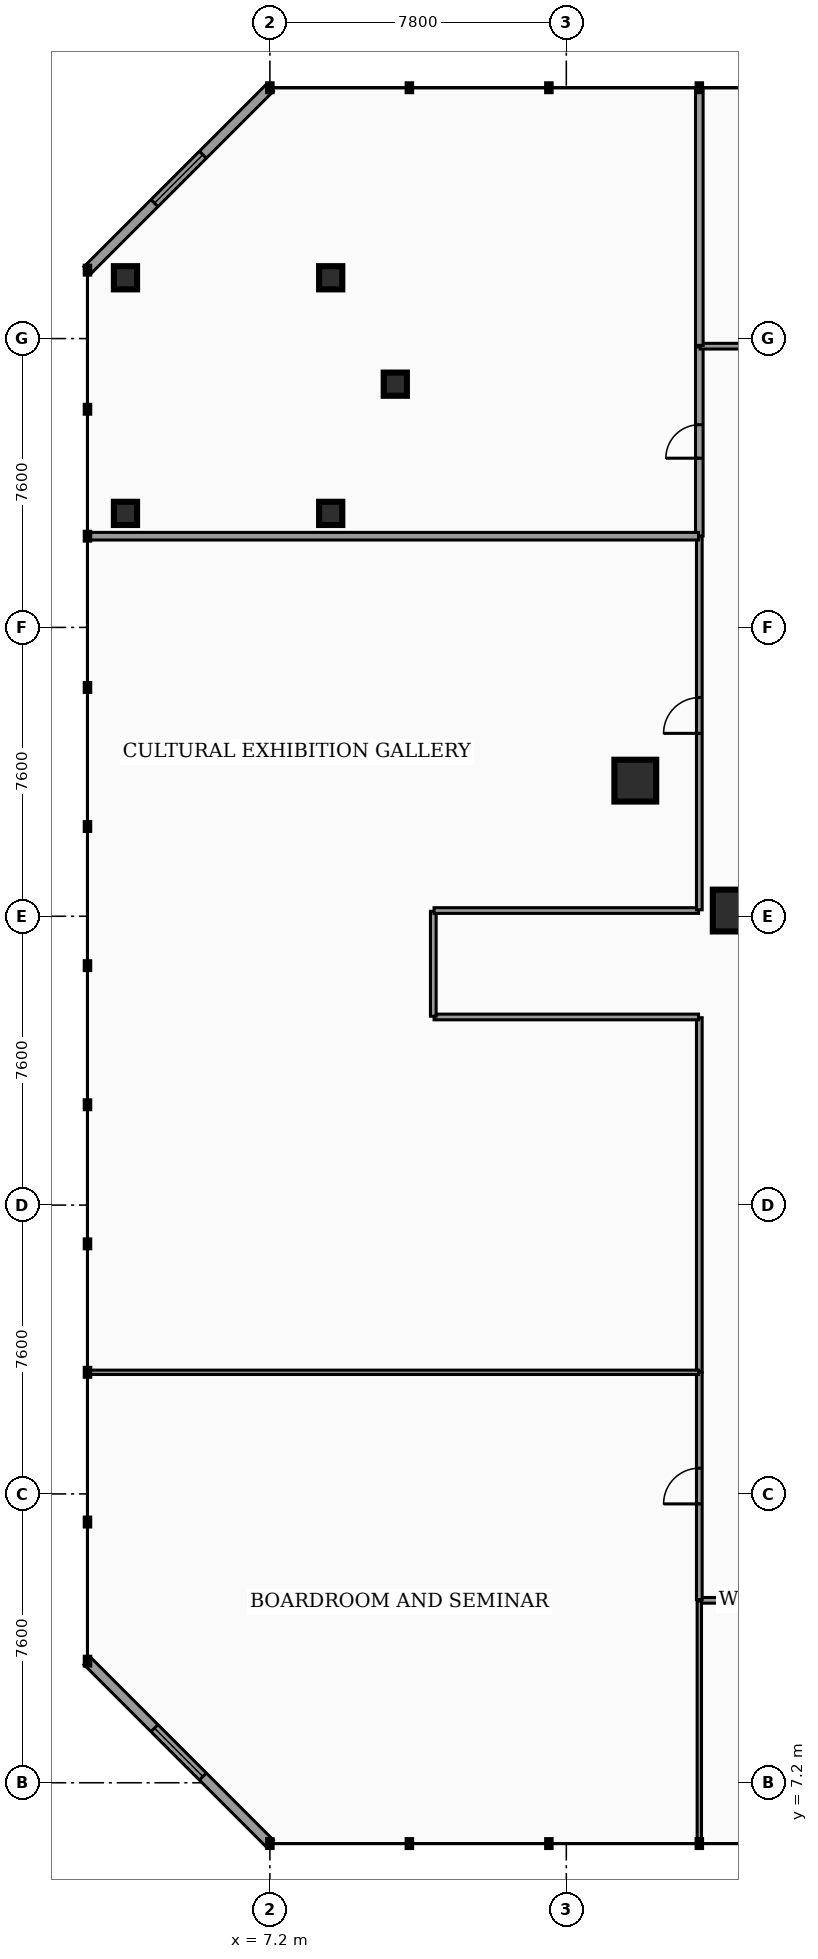
"""IFC4 building model, lengths in metres.
Left out: names, types, materials, properties, quantities, classifications, styles, units other than length and angle.
Written with IfcOpenShell. Run it as: python <this file> out.ifc"""

import sys

from ifc_helpers import new_model, si_unit, direction, frame, frame_2d, origin, origin_2d, place, context, subcontext, project, spatial, rectangle, hollow_rectangle, hollow_circle, extrude, element, fill, save


model = new_model("IFC4")
c1 = context("Model", 3, precision=1e-05, world=origin(), true_north=direction((0.0, 1.0)))
c2 = subcontext(c1, "Body", "Model", "MODEL_VIEW")
j1 = project(units=[si_unit("LENGTHUNIT", "METRE"), si_unit("PLANEANGLEUNIT", "RADIAN")], contexts=[c1])
p1 = place(None, origin())
s1 = spatial("IfcSite", under=j1, at=p1, CompositionType="ELEMENT")
p2 = place(p1, origin())
s2 = spatial("IfcBuilding", under=s1, at=p2, CompositionType="ELEMENT")
p3 = place(p2, frame((0.0, 0.0, 9.52)))
s3 = spatial("IfcBuildingStorey", under=s2, at=p3, CompositionType="ELEMENT", Elevation=9.52)
for number, where, z_axis, x_axis in (
    (1, (16.815, 33.568, 0.0), (0.0, 0.0, 1.0), (1.0, 0.0, 0.0)),
    (2, (19.405, 30.15, 0.0), (0.0, 0.0, 1.0), (1.0, 0.0, 0.0)),
):
    element("IfcColumn", number, at=place(p3, frame(where, z_axis=z_axis, x_axis=x_axis)), inside=s3, PredefinedType="COLUMN", context=c2, shape_type="SweptSolid", body=[
        extrude(hollow_rectangle(XDim=1.1, YDim=1.1, WallThickness=0.055, at=origin_2d()), origin(), (0.0, 0.0, 1.0), 4.14),
    ])
for number, where, z_axis, x_axis in (
    (3, (10.5, 44.0, 0.0), (0.0, 0.0, 1.0), (1.0, 0.0, 0.0)),
    (4, (3.4, 40.6, 0.0), (0.0, 0.0, 1.0), (1.0, 0.0, 0.0)),
    (5, (8.8, 40.6, 0.0), (0.0, 0.0, 1.0), (1.0, 0.0, 0.0)),
    (6, (3.4, 46.8, 0.0), (0.0, 0.0, 1.0), (1.0, 0.0, 0.0)),
    (7, (8.8, 46.8, 0.0), (0.0, 0.0, 1.0), (1.0, 0.0, 0.0)),
):
    element("IfcColumn", number, at=place(p3, frame(where, z_axis=z_axis, x_axis=x_axis)), inside=s3, PredefinedType="COLUMN", context=c2, shape_type="SweptSolid", body=[
        extrude(hollow_circle(Radius=0.305, WallThickness=0.025, at=origin_2d()), origin(), (0.0, 0.0, 1.0), 4.14),
    ])
p4 = place(p3, frame((2.4, 47.0, 0.0), z_axis=(0.0, 0.0, 1.0), x_axis=(0.707106781187, 0.707106781187, 0.0)))
e8 = element("IfcWall", 8, at=p4, inside=s3, PredefinedType="STANDARD", context=c2, shape_type="SweptSolid", body=[
    extrude(rectangle(XDim=6.788, YDim=0.26, at=frame_2d((3.394, 0.0))), origin(), (0.0, 0.0, 1.0), 3.65),
])
p5 = place(p4, frame((2.494, 0.0, 0.7)))
e9 = element("IfcOpeningElement", 9, at=p5, cuts=e8, PredefinedType="OPENING", context=c2, shape_type="SweptSolid", body=[
    extrude(rectangle(XDim=1.8, YDim=2.1, at=frame_2d((0.9, 1.05))), frame((0.0, 0.14, 0.0), z_axis=(0.0, -1.0, 0.0), x_axis=(1.0, 0.0, 0.0)), (0.0, 0.0, 1.0), 0.28),
])
p6 = place(p3, frame((2.4, 10.4, 0.0), z_axis=(0.0, 0.0, 1.0), x_axis=(0.707124763888, -0.707088798028, 0.0)))
e10 = element("IfcWall", 10, at=p6, inside=s3, PredefinedType="STANDARD", context=c2, shape_type="SweptSolid", body=[
    extrude(rectangle(XDim=6.788, YDim=0.26, at=frame_2d((3.394, 0.0))), origin(), (0.0, 0.0, 1.0), 3.65),
])
p7 = place(p6, frame((2.494, 0.0, 0.7)))
e11 = element("IfcOpeningElement", 11, at=p7, cuts=e10, PredefinedType="OPENING", context=c2, shape_type="SweptSolid", body=[
    extrude(rectangle(XDim=1.8, YDim=2.1, at=frame_2d((0.9, 1.05))), frame((0.0, 0.14, 0.0), z_axis=(0.0, -1.0, 0.0), x_axis=(1.0, 0.0, 0.0)), (0.0, 0.0, 1.0), 0.28),
])
p8 = place(p3, frame((18.52, 12.0, 0.0), z_axis=(0.0, 0.0, 1.0), x_axis=(1.0, 0.0, 0.0)))
e12 = element("IfcWall", 12, at=p8, inside=s3, PredefinedType="PARTITIONING", context=c2, shape_type="SweptSolid", body=[
    extrude(rectangle(XDim=2.96, YDim=0.15, at=frame_2d((1.48, 0.0))), origin(), (0.0, 0.0, 1.0), 3.097),
])
p9 = place(p3, frame((18.5, 12.02, 0.0), z_axis=(0.0, 0.0, 1.0), x_axis=(0.0, 1.0, 0.0)))
e13 = element("IfcWall", 13, at=p9, inside=s3, PredefinedType="PARTITIONING", context=c2, shape_type="SweptSolid", body=[
    extrude(rectangle(XDim=5.975, YDim=0.15, at=frame_2d((2.988, 0.0))), origin(), (0.0, 0.0, 1.0), 3.097),
])
p10 = place(p9, frame((2.518, 0.0, 0.0)))
e14 = element("IfcOpeningElement", 14, at=p10, cuts=e13, PredefinedType="OPENING", context=c2, shape_type="SweptSolid", body=[
    extrude(rectangle(XDim=0.94, YDim=2.05, at=frame_2d((0.47, 1.025))), frame((0.0, 0.085, 0.0), z_axis=(0.0, -1.0, 0.0), x_axis=(1.0, 0.0, 0.0)), (0.0, 0.0, 1.0), 0.17),
])
p11 = place(p3, frame((18.5, 18.005, 0.0), z_axis=(0.0, 0.0, 1.0), x_axis=(0.0, 1.0, 0.0)))
e15 = element("IfcWall", 15, at=p11, inside=s3, PredefinedType="PARTITIONING", context=c2, shape_type="SweptSolid", body=[
    extrude(rectangle(XDim=9.325, YDim=0.15, at=frame_2d((4.663, 0.0))), origin(), (0.0, 0.0, 1.0), 3.097),
])
p12 = place(p3, frame((11.52, 27.35, 0.0), z_axis=(0.0, 0.0, 1.0), x_axis=(1.0, 0.0, 0.0)))
e16 = element("IfcWall", 16, at=p12, inside=s3, PredefinedType="PARTITIONING", context=c2, shape_type="SweptSolid", body=[
    extrude(rectangle(XDim=6.96, YDim=0.15, at=frame_2d((3.48, 0.0))), origin(), (0.0, 0.0, 1.0), 3.097),
])
p13 = place(p3, frame((11.5, 27.37, 0.0), z_axis=(0.0, 0.0, 1.0), x_axis=(0.0, 1.0, 0.0)))
e17 = element("IfcWall", 17, at=p13, inside=s3, PredefinedType="PARTITIONING", context=c2, shape_type="SweptSolid", body=[
    extrude(rectangle(XDim=2.76, YDim=0.15, at=frame_2d((1.38, 0.0))), origin(), (0.0, 0.0, 1.0), 3.097),
])
p14 = place(p3, frame((11.52, 30.15, 0.0), z_axis=(0.0, 0.0, 1.0), x_axis=(1.0, 0.0, 0.0)))
e18 = element("IfcWall", 18, at=p14, inside=s3, PredefinedType="PARTITIONING", context=c2, shape_type="SweptSolid", body=[
    extrude(rectangle(XDim=6.96, YDim=0.15, at=frame_2d((3.48, 0.0))), origin(), (0.0, 0.0, 1.0), 3.097),
])
p15 = place(p3, frame((18.5, 30.17, 0.0), z_axis=(0.0, 0.0, 1.0), x_axis=(0.0, 1.0, 0.0)))
e19 = element("IfcWall", 19, at=p15, inside=s3, PredefinedType="PARTITIONING", context=c2, shape_type="SweptSolid", body=[
    extrude(rectangle(XDim=9.825, YDim=0.15, at=frame_2d((4.913, 0.0))), origin(), (0.0, 0.0, 1.0), 3.097),
])
p16 = place(p15, frame((4.643, 0.0, 0.0)))
e20 = element("IfcOpeningElement", 20, at=p16, cuts=e19, PredefinedType="OPENING", context=c2, shape_type="SweptSolid", body=[
    extrude(rectangle(XDim=0.94, YDim=2.05, at=frame_2d((0.47, 1.025))), frame((0.0, 0.085, 0.0), z_axis=(0.0, -1.0, 0.0), x_axis=(1.0, 0.0, 0.0)), (0.0, 0.0, 1.0), 0.17),
])
p17 = place(p3, frame((18.5, 40.005, 0.0), z_axis=(0.0, 0.0, 1.0), x_axis=(0.0, 1.0, 0.0)))
e21 = element("IfcWall", 21, at=p17, inside=s3, PredefinedType="PARTITIONING", context=c2, shape_type="SweptSolid", body=[
    extrude(rectangle(XDim=4.975, YDim=0.2, at=frame_2d((2.488, 0.0))), origin(), (0.0, 0.0, 1.0), 3.097),
])
p18 = place(p17, frame((2.048, 0.0, 0.0)))
e22 = element("IfcOpeningElement", 22, at=p18, cuts=e21, PredefinedType="OPENING", context=c2, shape_type="SweptSolid", body=[
    extrude(rectangle(XDim=0.88, YDim=2.05, at=frame_2d((0.44, 1.025))), frame((0.0, 0.11, 0.0), z_axis=(0.0, -1.0, 0.0), x_axis=(1.0, 0.0, 0.0)), (0.0, 0.0, 1.0), 0.22),
])
p19 = place(p3, frame((18.52, 45.0, 0.0), z_axis=(0.0, 0.0, 1.0), x_axis=(1.0, 0.0, 0.0)))
e23 = element("IfcWall", 23, at=p19, inside=s3, PredefinedType="PARTITIONING", context=c2, shape_type="SweptSolid", body=[
    extrude(rectangle(XDim=2.96, YDim=0.15, at=frame_2d((1.48, 0.0))), origin(), (0.0, 0.0, 1.0), 3.097),
])
p20 = place(p3, frame((18.5, 5.615, 0.0), z_axis=(0.0, 0.0, 1.0), x_axis=(0.0, 1.0, 0.0)))
e24 = element("IfcWall", 24, at=p20, inside=s3, PredefinedType="MOVABLE", context=c2, shape_type="SweptSolid", body=[
    extrude(rectangle(XDim=6.365, YDim=0.115, at=frame_2d((3.183, 0.0))), origin(), (0.0, 0.0, 1.0), 3.097),
])
p21 = place(p3, frame((2.415, 18.0, 0.0), z_axis=(0.0, 0.0, 1.0), x_axis=(1.0, 0.0, 0.0)))
e25 = element("IfcWall", 25, at=p21, inside=s3, PredefinedType="MOVABLE", context=c2, shape_type="SweptSolid", body=[
    extrude(rectangle(XDim=16.065, YDim=0.115, at=frame_2d((8.032, 0.0))), origin(), (0.0, 0.0, 1.0), 3.097),
])
p22 = place(p3, frame((2.415, 40.0, 0.0), z_axis=(0.0, 0.0, 1.0), x_axis=(1.0, 0.0, 0.0)))
e26 = element("IfcWall", 26, at=p22, inside=s3, PredefinedType="PARTITIONING", context=c2, shape_type="SweptSolid", body=[
    extrude(rectangle(XDim=16.065, YDim=0.2, at=frame_2d((8.032, 0.0))), origin(), (0.0, 0.0, 1.0), 3.097),
])
p23 = place(p3, frame((18.5, 45.02, 0.0), z_axis=(0.0, 0.0, 1.0), x_axis=(0.0, 1.0, 0.0)))
e27 = element("IfcWall", 27, at=p23, inside=s3, PredefinedType="PARTITIONING", context=c2, shape_type="SweptSolid", body=[
    extrude(rectangle(XDim=6.765, YDim=0.2, at=frame_2d((3.382, 0.0))), origin(), (0.0, 0.0, 1.0), 3.097),
])
p24 = place(p5, origin())
e28 = element("IfcWindow", 28, at=p24, inside=s3, PartitioningType="SINGLE_PANEL", PredefinedType="WINDOW", context=c2, shape_type="SweptSolid", body=[
    extrude(rectangle(XDim=1.8, YDim=2.1, at=frame_2d((0.9, 1.05))), frame((0.0, 0.03, 0.0), z_axis=(0.0, -1.0, 0.0), x_axis=(1.0, 0.0, 0.0)), (0.0, 0.0, 1.0), 0.06),
])
fill(e9, e28)
p25 = place(p7, origin())
e29 = element("IfcWindow", 29, at=p25, inside=s3, PartitioningType="SINGLE_PANEL", PredefinedType="WINDOW", context=c2, shape_type="SweptSolid", body=[
    extrude(rectangle(XDim=1.8, YDim=2.1, at=frame_2d((0.9, 1.05))), frame((0.0, 0.03, 0.0), z_axis=(0.0, -1.0, 0.0), x_axis=(1.0, 0.0, 0.0)), (0.0, 0.0, 1.0), 0.06),
])
fill(e11, e29)
p26 = place(p10, origin())
e30 = element("IfcDoor", 30, at=p26, inside=s3, OperationType="SINGLE_SWING_LEFT", PredefinedType="DOOR", context=c2, shape_type="SweptSolid", body=[
    extrude(rectangle(XDim=0.94, YDim=2.05, at=frame_2d((0.47, 1.025))), frame((0.0, 0.025, 0.0), z_axis=(0.0, -1.0, 0.0), x_axis=(1.0, 0.0, 0.0)), (0.0, 0.0, 1.0), 0.05),
])
fill(e14, e30)
p27 = place(p16, origin())
e31 = element("IfcDoor", 31, at=p27, inside=s3, OperationType="SINGLE_SWING_LEFT", PredefinedType="DOOR", context=c2, shape_type="SweptSolid", body=[
    extrude(rectangle(XDim=0.94, YDim=2.05, at=frame_2d((0.47, 1.025))), frame((0.0, 0.025, 0.0), z_axis=(0.0, -1.0, 0.0), x_axis=(1.0, 0.0, 0.0)), (0.0, 0.0, 1.0), 0.05),
])
fill(e20, e31)
p28 = place(p18, origin())
e32 = element("IfcDoor", 32, at=p28, inside=s3, OperationType="SINGLE_SWING_LEFT", PredefinedType="DOOR", context=c2, shape_type="SweptSolid", body=[
    extrude(rectangle(XDim=0.88, YDim=2.05, at=frame_2d((0.44, 1.025))), frame((0.0, 0.025, 0.0), z_axis=(0.0, -1.0, 0.0), x_axis=(1.0, 0.0, 0.0)), (0.0, 0.0, 1.0), 0.05),
])
fill(e22, e32)
save(model, sys.argv[1])
